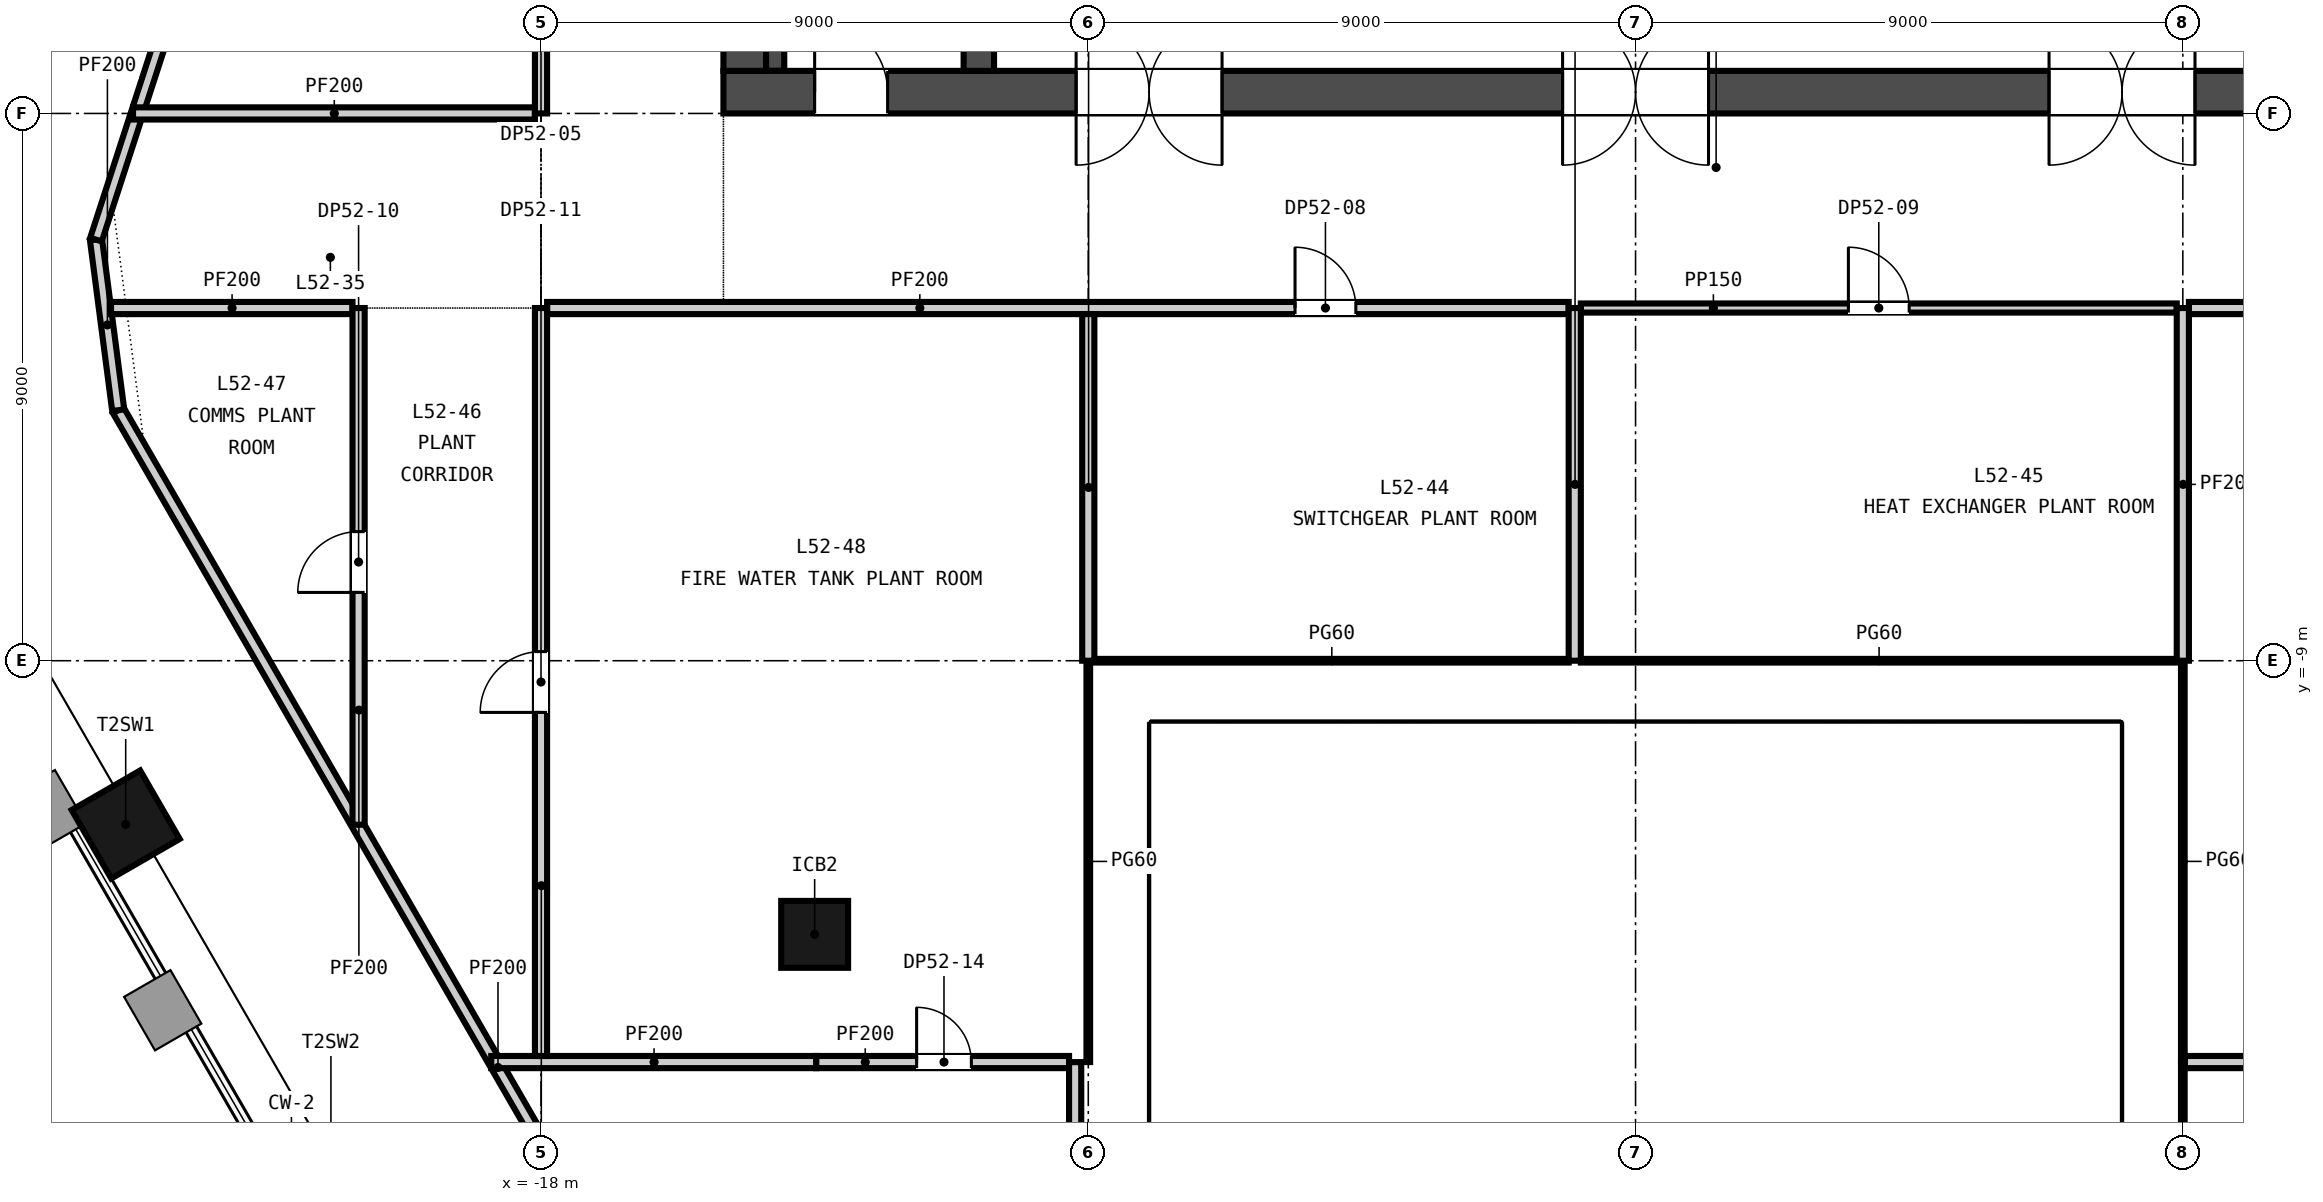
"""IFC4 building model, lengths in metres.
Left out: names, types, materials, properties, quantities, classifications, styles, units other than length and angle.
Written with IfcOpenShell. Run it as: python <this file> out.ifc"""

import sys

from ifc_helpers import new_model, si_unit, direction, frame, frame_2d, origin, origin_2d, place, context, subcontext, project, spatial, rectangle, extrude, element, fill, save


model = new_model("IFC4")
c1 = context("Model", 3, precision=1e-05, world=origin(), true_north=direction((0.0, 1.0)))
c2 = subcontext(c1, "Body", "Model", "MODEL_VIEW")
j1 = project(units=[si_unit("LENGTHUNIT", "METRE"), si_unit("PLANEANGLEUNIT", "RADIAN")], contexts=[c1])
p1 = place(None, origin())
s1 = spatial("IfcSite", under=j1, at=p1, CompositionType="ELEMENT")
p2 = place(p1, origin())
s2 = spatial("IfcBuilding", under=s1, at=p2, CompositionType="ELEMENT")
p3 = place(p2, frame((0.0, 0.0, 207.3)))
s3 = spatial("IfcBuildingStorey", under=s2, at=p3, CompositionType="ELEMENT", Elevation=207.3)
p4 = place(p3, frame((-15.0, 0.35, -0.3), z_axis=(0.0, 0.0, 1.0), x_axis=(1.0, 0.0, 0.0)))
e1 = element("IfcWall", 1, at=p4, inside=s3, PredefinedType="SOLIDWALL", context=c2, shape_type="SweptSolid", body=[
    extrude(rectangle(XDim=30.0, YDim=0.7, at=frame_2d((15.0, 0.0))), origin(), (0.0, 0.0, 1.0), 4.5),
])
p5 = place(p4, frame((5.8, 0.0, 0.3)))
e2 = element("IfcOpeningElement", 2, at=p5, cuts=e1, PredefinedType="OPENING", context=c2, shape_type="SweptSolid", body=[
    extrude(rectangle(XDim=2.4, YDim=2.4, at=frame_2d((1.2, 1.2))), frame((0.0, 0.36, 0.0), z_axis=(0.0, -1.0, 0.0), x_axis=(1.0, 0.0, 0.0)), (0.0, 0.0, 1.0), 0.72),
])
p6 = place(p4, frame((13.8, 0.0, 0.3)))
e3 = element("IfcOpeningElement", 3, at=p6, cuts=e1, PredefinedType="OPENING", context=c2, shape_type="SweptSolid", body=[
    extrude(rectangle(XDim=2.4, YDim=2.4, at=frame_2d((1.2, 1.2))), frame((0.0, 0.36, 0.0), z_axis=(0.0, -1.0, 0.0), x_axis=(1.0, 0.0, 0.0)), (0.0, 0.0, 1.0), 0.72),
])
p7 = place(p4, frame((21.8, 0.0, 0.3)))
e4 = element("IfcOpeningElement", 4, at=p7, cuts=e1, PredefinedType="OPENING", context=c2, shape_type="SweptSolid", body=[
    extrude(rectangle(XDim=2.4, YDim=2.4, at=frame_2d((1.2, 1.2))), frame((0.0, 0.36, 0.0), z_axis=(0.0, -1.0, 0.0), x_axis=(1.0, 0.0, 0.0)), (0.0, 0.0, 1.0), 0.72),
])
p8 = place(p4, frame((1.5, 0.0, 0.3)))
e5 = element("IfcOpeningElement", 5, at=p8, cuts=e1, PredefinedType="OPENING", context=c2, shape_type="SweptSolid", body=[
    extrude(rectangle(XDim=1.2, YDim=2.1, at=frame_2d((0.6, 1.05))), frame((0.0, 0.36, 0.0), z_axis=(0.0, -1.0, 0.0), x_axis=(1.0, 0.0, 0.0)), (0.0, 0.0, 1.0), 0.72),
])
p9 = place(p4, frame((27.3, 0.0, 0.3)))
e6 = element("IfcOpeningElement", 6, at=p9, cuts=e1, PredefinedType="OPENING", context=c2, shape_type="SweptSolid", body=[
    extrude(rectangle(XDim=1.2, YDim=2.1, at=frame_2d((0.6, 1.05))), frame((0.0, 0.36, 0.0), z_axis=(0.0, -1.0, 0.0), x_axis=(1.0, 0.0, 0.0)), (0.0, 0.0, 1.0), 0.72),
])
p10 = place(p3, frame((-14.65, 0.7, -0.3), z_axis=(0.0, 0.0, 1.0), x_axis=(0.0, 1.0, 0.0)))
e7 = element("IfcWall", 7, at=p10, inside=s3, PredefinedType="SOLIDWALL", context=c2, shape_type="SweptSolid", body=[
    extrude(rectangle(XDim=13.6, YDim=0.7, at=frame_2d((6.8, 0.0))), origin(), (0.0, 0.0, 1.0), 4.5),
])
p11 = place(p3, frame((-10.8, 0.7, -0.3), z_axis=(0.0, 0.0, 1.0), x_axis=(0.0, 1.0, 0.0)))
e8 = element("IfcWall", 8, at=p11, inside=s3, PredefinedType="SOLIDWALL", context=c2, shape_type="SweptSolid", body=[
    extrude(rectangle(XDim=13.6, YDim=0.5, at=frame_2d((6.8, 0.0))), origin(), (0.0, 0.0, 1.0), 4.5),
])
p12 = place(p3, frame((-24.83, -11.693, -0.3), z_axis=(0.0, 0.0, 1.0), x_axis=(0.5, -0.866025403784, 0.0)))
e9 = element("IfcColumn", 9, at=p12, inside=s3, PredefinedType="COLUMN", context=c2, shape_type="SweptSolid", body=[
    extrude(rectangle(XDim=1.3, YDim=1.3, at=origin_2d()), origin(), (0.0, 0.0, 1.0), 4.5),
])
p13 = place(p3, frame((-13.5, -13.5, -0.3), z_axis=(0.0, 0.0, 1.0), x_axis=(1.0, 0.0, 0.0)))
e10 = element("IfcColumn", 10, at=p13, inside=s3, PredefinedType="COLUMN", context=c2, shape_type="SweptSolid", body=[
    extrude(rectangle(XDim=1.1, YDim=1.1, at=origin_2d()), origin(), (0.0, 0.0, 1.0), 4.5),
])
p14 = place(p3, frame((-14.15, 0.7, 0.0), z_axis=(0.0, 0.0, 1.0), x_axis=(0.0, 1.0, 0.0)))
e11 = element("IfcWall", 11, at=p14, inside=s3, PredefinedType="SOLIDWALL", context=c2, shape_type="SweptSolid", body=[
    extrude(rectangle(XDim=13.6, YDim=0.3, at=frame_2d((6.8, 0.0))), origin(), (0.0, 0.0, 1.0), 4.2),
])
p15 = place(p3, frame((-18.818, -15.6, 0.0), z_axis=(0.0, 0.0, 1.0), x_axis=(1.0, 0.0, 0.0)))
e12 = element("IfcWall", 12, at=p15, inside=s3, PredefinedType="PARTITIONING", context=c2, shape_type="SweptSolid", body=[
    extrude(rectangle(XDim=5.345, YDim=0.2, at=frame_2d((2.673, 0.0))), origin(), (0.0, 0.0, 1.0), 4.2),
])
p16 = place(p3, frame((-13.473, -15.6, 0.0), z_axis=(0.0, 0.0, 1.0), x_axis=(1.0, 0.0, 0.0)))
e13 = element("IfcWall", 13, at=p16, inside=s3, PredefinedType="PARTITIONING", context=c2, shape_type="SweptSolid", body=[
    extrude(rectangle(XDim=4.157, YDim=0.2, at=frame_2d((2.079, 0.0))), origin(), (0.0, 0.0, 1.0), 3.749),
])
p17 = place(p16, frame((1.65, 0.0, 0.0)))
e14 = element("IfcOpeningElement", 14, at=p17, cuts=e13, PredefinedType="OPENING", context=c2, shape_type="SweptSolid", body=[
    extrude(rectangle(XDim=0.9, YDim=2.1, at=frame_2d((0.45, 1.05))), frame((0.0, 0.11, 0.0), z_axis=(0.0, -1.0, 0.0), x_axis=(1.0, 0.0, 0.0)), (0.0, 0.0, 1.0), 0.22),
])
p18 = place(p3, frame((9.03, -15.6, 0.0), z_axis=(0.0, 0.0, 1.0), x_axis=(1.0, 0.0, 0.0)))
e15 = element("IfcWall", 15, at=p18, inside=s3, PredefinedType="PARTITIONING", context=c2, shape_type="SweptSolid", body=[
    extrude(rectangle(XDim=4.484, YDim=0.2, at=frame_2d((2.242, 0.0))), origin(), (0.0, 0.0, 1.0), 4.2),
])
p19 = place(p3, frame((-8.9, -9.0, 0.0), z_axis=(0.0, 0.0, 1.0), x_axis=(1.0, 0.0, 0.0)))
e16 = element("IfcWall", 16, at=p19, inside=s3, PredefinedType="PARTITIONING", context=c2, shape_type="SweptSolid", body=[
    extrude(rectangle(XDim=7.8, YDim=0.06, at=frame_2d((3.9, 0.0))), origin(), (0.0, 0.0, 1.0), 4.2),
])
p20 = place(p3, frame((-0.9, -9.0, 0.0), z_axis=(0.0, 0.0, 1.0), x_axis=(1.0, 0.0, 0.0)))
e17 = element("IfcWall", 17, at=p20, inside=s3, PredefinedType="PARTITIONING", context=c2, shape_type="SweptSolid", body=[
    extrude(rectangle(XDim=9.8, YDim=0.06, at=frame_2d((4.9, 0.0))), origin(), (0.0, 0.0, 1.0), 4.2),
])
p21 = place(p3, frame((-25.071, -3.2, 0.0), z_axis=(0.0, 0.0, 1.0), x_axis=(1.0, 0.0, 0.0)))
e18 = element("IfcWall", 18, at=p21, inside=s3, PredefinedType="PARTITIONING", context=c2, shape_type="SweptSolid", body=[
    extrude(rectangle(XDim=3.971, YDim=0.2, at=frame_2d((1.985, 0.0))), origin(), (0.0, 0.0, 1.0), 4.2),
])
p22 = place(p3, frame((-17.9, -3.2, 0.0), z_axis=(0.0, 0.0, 1.0), x_axis=(1.0, 0.0, 0.0)))
e19 = element("IfcWall", 19, at=p22, inside=s3, PredefinedType="PARTITIONING", context=c2, shape_type="SweptSolid", body=[
    extrude(rectangle(XDim=16.8, YDim=0.2, at=frame_2d((8.4, 0.0))), origin(), (0.0, 0.0, 1.0), 4.2),
])
p23 = place(p22, frame((12.3, 0.0, 0.0)))
e20 = element("IfcOpeningElement", 20, at=p23, cuts=e19, PredefinedType="OPENING", context=c2, shape_type="SweptSolid", body=[
    extrude(rectangle(XDim=1.0, YDim=2.1, at=frame_2d((0.5, 1.05))), frame((0.0, 0.11, 0.0), z_axis=(0.0, -1.0, 0.0), x_axis=(1.0, 0.0, 0.0)), (0.0, 0.0, 1.0), 0.22),
])
p24 = place(p3, frame((-0.9, -3.2, 0.0), z_axis=(0.0, 0.0, 1.0), x_axis=(1.0, 0.0, 0.0)))
e21 = element("IfcWall", 21, at=p24, inside=s3, PredefinedType="PARTITIONING", context=c2, shape_type="SweptSolid", body=[
    extrude(rectangle(XDim=9.8, YDim=0.15, at=frame_2d((4.9, 0.0))), origin(), (0.0, 0.0, 1.0), 4.2),
])
p25 = place(p24, frame((4.4, 0.0, 0.0)))
e22 = element("IfcOpeningElement", 22, at=p25, cuts=e21, PredefinedType="OPENING", context=c2, shape_type="SweptSolid", body=[
    extrude(rectangle(XDim=1.0, YDim=2.1, at=frame_2d((0.5, 1.05))), frame((0.0, 0.085, 0.0), z_axis=(0.0, -1.0, 0.0), x_axis=(1.0, 0.0, 0.0)), (0.0, 0.0, 1.0), 0.17),
])
p26 = place(p3, frame((9.1, -3.2, 0.0), z_axis=(0.0, 0.0, 1.0), x_axis=(1.0, 0.0, 0.0)))
e23 = element("IfcWall", 23, at=p26, inside=s3, PredefinedType="PARTITIONING", context=c2, shape_type="SweptSolid", body=[
    extrude(rectangle(XDim=8.8, YDim=0.2, at=frame_2d((4.4, 0.0))), origin(), (0.0, 0.0, 1.0), 4.2),
])
p27 = place(p3, frame((-24.709, 0.0, 0.0), z_axis=(0.0, 0.0, 1.0), x_axis=(1.0, 0.0, 0.0)))
e24 = element("IfcWall", 24, at=p27, inside=s3, PredefinedType="PARTITIONING", context=c2, shape_type="SweptSolid", body=[
    extrude(rectangle(XDim=6.609, YDim=0.2, at=frame_2d((3.305, 0.0))), origin(), (0.0, 0.0, 1.0), 4.2),
])
p28 = place(p3, frame((-21.0, -11.697, 0.0), z_axis=(0.0, 0.0, 1.0), x_axis=(0.0, 1.0, 0.0)))
e25 = element("IfcWall", 25, at=p28, inside=s3, PredefinedType="PARTITIONING", context=c2, shape_type="SweptSolid", body=[
    extrude(rectangle(XDim=8.497, YDim=0.2, at=frame_2d((4.249, 0.0))), origin(), (0.0, 0.0, 1.0), 4.2),
])
p29 = place(p28, frame((3.82, 0.0, 0.0)))
e26 = element("IfcOpeningElement", 26, at=p29, cuts=e25, PredefinedType="OPENING", context=c2, shape_type="SweptSolid", body=[
    extrude(rectangle(XDim=1.0, YDim=2.1, at=frame_2d((0.5, 1.05))), frame((0.0, 0.11, 0.0), z_axis=(0.0, -1.0, 0.0), x_axis=(1.0, 0.0, 0.0)), (0.0, 0.0, 1.0), 0.22),
])
p30 = place(p3, frame((-18.0, -15.5, 0.0), z_axis=(0.0, 0.0, 1.0), x_axis=(0.0, 1.0, 0.0)))
e27 = element("IfcWall", 27, at=p30, inside=s3, PredefinedType="PARTITIONING", context=c2, shape_type="SweptSolid", body=[
    extrude(rectangle(XDim=12.3, YDim=0.2, at=frame_2d((6.15, 0.0))), origin(), (0.0, 0.0, 1.0), 4.2),
])
p31 = place(p30, frame((5.65, 0.0, 0.0)))
e28 = element("IfcOpeningElement", 28, at=p31, cuts=e27, PredefinedType="OPENING", context=c2, shape_type="SweptSolid", body=[
    extrude(rectangle(XDim=1.0, YDim=2.1, at=frame_2d((0.5, 1.05))), frame((0.0, 0.11, 0.0), z_axis=(0.0, -1.0, 0.0), x_axis=(1.0, 0.0, 0.0)), (0.0, 0.0, 1.0), 0.22),
])
p32 = place(p3, frame((-18.0, 0.0, 0.0), z_axis=(0.0, 0.0, 1.0), x_axis=(0.0, 1.0, 0.0)))
e29 = element("IfcWall", 29, at=p32, inside=s3, PredefinedType="PARTITIONING", context=c2, shape_type="SweptSolid", body=[
    extrude(rectangle(XDim=15.0, YDim=0.2, at=frame_2d((7.5, 0.0))), origin(), (0.0, 0.0, 1.0), 4.2),
])
p33 = place(p32, frame((6.9, 0.0, 0.0)))
e30 = element("IfcOpeningElement", 30, at=p33, cuts=e29, PredefinedType="OPENING", context=c2, shape_type="SweptSolid", body=[
    extrude(rectangle(XDim=1.0, YDim=2.1, at=frame_2d((0.5, 1.05))), frame((0.0, 0.11, 0.0), z_axis=(0.0, -1.0, 0.0), x_axis=(1.0, 0.0, 0.0)), (0.0, 0.0, 1.0), 0.22),
])
p34 = place(p3, frame((-9.216, -25.818, 0.0), z_axis=(0.0, 0.0, 1.0), x_axis=(0.0, 1.0, 0.0)))
e31 = element("IfcWall", 31, at=p34, inside=s3, PredefinedType="PARTITIONING", context=c2, shape_type="SweptSolid", body=[
    extrude(rectangle(XDim=10.217, YDim=0.2, at=frame_2d((5.109, 0.0))), origin(), (0.0, 0.0, 1.0), 4.2),
])
p35 = place(p3, frame((-9.0, -15.6, 0.0), z_axis=(0.0, 0.0, 1.0), x_axis=(0.0, 1.0, 0.0)))
e32 = element("IfcWall", 32, at=p35, inside=s3, PredefinedType="PARTITIONING", context=c2, shape_type="SweptSolid", body=[
    extrude(rectangle(XDim=6.599, YDim=0.06, at=frame_2d((3.3, 0.0))), origin(), (0.0, 0.0, 1.0), 4.2),
])
p36 = place(p3, frame((-9.0, -9.0, 0.0), z_axis=(0.0, 0.0, 1.0), x_axis=(0.0, 1.0, 0.0)))
e33 = element("IfcWall", 33, at=p36, inside=s3, PredefinedType="PARTITIONING", context=c2, shape_type="SweptSolid", body=[
    extrude(rectangle(XDim=5.7, YDim=0.2, at=frame_2d((2.85, 0.0))), origin(), (0.0, 0.0, 1.0), 4.2),
])
p37 = place(p3, frame((-1.0, -9.0, 0.0), z_axis=(0.0, 0.0, 1.0), x_axis=(0.0, 1.0, 0.0)))
e34 = element("IfcWall", 34, at=p37, inside=s3, PredefinedType="PARTITIONING", context=c2, shape_type="SweptSolid", body=[
    extrude(rectangle(XDim=5.8, YDim=0.2, at=frame_2d((2.9, 0.0))), origin(), (0.0, 0.0, 1.0), 4.2),
])
p38 = place(p3, frame((9.0, -21.947, 0.0), z_axis=(0.0, 0.0, 1.0), x_axis=(0.0, 1.0, 0.0)))
e35 = element("IfcWall", 35, at=p38, inside=s3, PredefinedType="PARTITIONING", context=c2, shape_type="SweptSolid", body=[
    extrude(rectangle(XDim=6.345, YDim=0.06, at=frame_2d((3.173, 0.0))), origin(), (0.0, 0.0, 1.0), 4.2),
])
p39 = place(p3, frame((9.0, -15.599, 0.0), z_axis=(0.0, 0.0, 1.0), x_axis=(0.0, 1.0, 0.0)))
e36 = element("IfcWall", 36, at=p39, inside=s3, PredefinedType="PARTITIONING", context=c2, shape_type="SweptSolid", body=[
    extrude(rectangle(XDim=6.598, YDim=0.06, at=frame_2d((3.299, 0.0))), origin(), (0.0, 0.0, 1.0), 4.2),
])
p40 = place(p3, frame((9.0, -9.0, 0.0), z_axis=(0.0, 0.0, 1.0), x_axis=(0.0, 1.0, 0.0)))
e37 = element("IfcWall", 37, at=p40, inside=s3, PredefinedType="PARTITIONING", context=c2, shape_type="SweptSolid", body=[
    extrude(rectangle(XDim=5.8, YDim=0.2, at=frame_2d((2.9, 0.0))), origin(), (0.0, 0.0, 1.0), 4.2),
])
p41 = place(p3, frame((-12.472, -26.498, 0.0), z_axis=(0.0, 0.0, 1.0), x_axis=(-0.499996482004, 0.866027434891, 0.0)))
e38 = element("IfcWall", 38, at=p41, inside=s3, PredefinedType="PARTITIONING", context=c2, shape_type="SweptSolid", body=[
    extrude(rectangle(XDim=24.962, YDim=0.2, at=frame_2d((12.481, 0.0))), origin(), (0.0, 0.0, 1.0), 4.2),
])
p42 = place(p3, frame((-24.953, -4.88, 0.0), z_axis=(0.0, 0.0, 1.0), x_axis=(-0.129173182048, 0.991622049493, 0.0)))
e39 = element("IfcWall", 39, at=p42, inside=s3, PredefinedType="PARTITIONING", context=c2, shape_type="SweptSolid", body=[
    extrude(rectangle(XDim=2.829, YDim=0.2, at=frame_2d((1.415, 0.0))), origin(), (0.0, 0.0, 1.0), 4.2),
])
p43 = place(p3, frame((-25.318, -2.075, 0.0), z_axis=(0.0, 0.0, 1.0), x_axis=(0.309016450058, 0.951056693154, 0.0)))
e40 = element("IfcWall", 40, at=p43, inside=s3, PredefinedType="PARTITIONING", context=c2, shape_type="SweptSolid", body=[
    extrude(rectangle(XDim=27.356, YDim=0.2, at=frame_2d((13.678, 0.0))), origin(), (0.0, 0.0, 1.0), 4.2),
])
p44 = place(p5, origin())
e41 = element("IfcDoor", 41, at=p44, inside=s3, OperationType="DOUBLE_DOOR_DOUBLE_SWING", PredefinedType="DOOR", context=c2, shape_type="SweptSolid", body=[
    extrude(rectangle(XDim=2.4, YDim=2.4, at=frame_2d((1.2, 1.2))), frame((0.0, 0.025, 0.0), z_axis=(0.0, -1.0, 0.0), x_axis=(1.0, 0.0, 0.0)), (0.0, 0.0, 1.0), 0.05),
])
fill(e2, e41)
p45 = place(p6, origin())
e42 = element("IfcDoor", 42, at=p45, inside=s3, OperationType="DOUBLE_DOOR_DOUBLE_SWING", PredefinedType="DOOR", context=c2, shape_type="SweptSolid", body=[
    extrude(rectangle(XDim=2.4, YDim=2.4, at=frame_2d((1.2, 1.2))), frame((0.0, 0.025, 0.0), z_axis=(0.0, -1.0, 0.0), x_axis=(1.0, 0.0, 0.0)), (0.0, 0.0, 1.0), 0.05),
])
fill(e3, e42)
p46 = place(p7, origin())
e43 = element("IfcDoor", 43, at=p46, inside=s3, OperationType="DOUBLE_DOOR_DOUBLE_SWING", PredefinedType="DOOR", context=c2, shape_type="SweptSolid", body=[
    extrude(rectangle(XDim=2.4, YDim=2.4, at=frame_2d((1.2, 1.2))), frame((0.0, 0.025, 0.0), z_axis=(0.0, -1.0, 0.0), x_axis=(1.0, 0.0, 0.0)), (0.0, 0.0, 1.0), 0.05),
])
fill(e4, e43)
p47 = place(p8, origin())
e44 = element("IfcDoor", 44, at=p47, inside=s3, OperationType="SINGLE_SWING_LEFT", PredefinedType="DOOR", context=c2, shape_type="SweptSolid", body=[
    extrude(rectangle(XDim=1.2, YDim=2.1, at=frame_2d((0.6, 1.05))), frame((0.0, 0.025, 0.0), z_axis=(0.0, -1.0, 0.0), x_axis=(1.0, 0.0, 0.0)), (0.0, 0.0, 1.0), 0.05),
])
fill(e5, e44)
p48 = place(p23, origin())
e45 = element("IfcDoor", 45, at=p48, inside=s3, OperationType="SINGLE_SWING_LEFT", PredefinedType="DOOR", context=c2, shape_type="SweptSolid", body=[
    extrude(rectangle(XDim=1.0, YDim=2.1, at=frame_2d((0.5, 1.05))), frame((0.0, 0.025, 0.0), z_axis=(0.0, -1.0, 0.0), x_axis=(1.0, 0.0, 0.0)), (0.0, 0.0, 1.0), 0.05),
])
fill(e20, e45)
p49 = place(p25, origin())
e46 = element("IfcDoor", 46, at=p49, inside=s3, OperationType="SINGLE_SWING_LEFT", PredefinedType="DOOR", context=c2, shape_type="SweptSolid", body=[
    extrude(rectangle(XDim=1.0, YDim=2.1, at=frame_2d((0.5, 1.05))), frame((0.0, 0.025, 0.0), z_axis=(0.0, -1.0, 0.0), x_axis=(1.0, 0.0, 0.0)), (0.0, 0.0, 1.0), 0.05),
])
fill(e22, e46)
p50 = place(p29, origin())
e47 = element("IfcDoor", 47, at=p50, inside=s3, OperationType="SINGLE_SWING_LEFT", PredefinedType="DOOR", context=c2, shape_type="SweptSolid", body=[
    extrude(rectangle(XDim=1.0, YDim=2.1, at=frame_2d((0.5, 1.05))), frame((0.0, 0.025, 0.0), z_axis=(0.0, -1.0, 0.0), x_axis=(1.0, 0.0, 0.0)), (0.0, 0.0, 1.0), 0.05),
])
fill(e26, e47)
p51 = place(p31, origin())
e48 = element("IfcDoor", 48, at=p51, inside=s3, OperationType="SINGLE_SWING_LEFT", PredefinedType="DOOR", context=c2, shape_type="SweptSolid", body=[
    extrude(rectangle(XDim=1.0, YDim=2.1, at=frame_2d((0.5, 1.05))), frame((0.0, 0.025, 0.0), z_axis=(0.0, -1.0, 0.0), x_axis=(1.0, 0.0, 0.0)), (0.0, 0.0, 1.0), 0.05),
])
fill(e28, e48)
p52 = place(p17, origin())
e49 = element("IfcDoor", 49, at=p52, inside=s3, OperationType="SINGLE_SWING_LEFT", PredefinedType="DOOR", context=c2, shape_type="SweptSolid", body=[
    extrude(rectangle(XDim=0.9, YDim=2.1, at=frame_2d((0.45, 1.05))), frame((0.0, 0.025, 0.0), z_axis=(0.0, -1.0, 0.0), x_axis=(1.0, 0.0, 0.0)), (0.0, 0.0, 1.0), 0.05),
])
fill(e14, e49)
save(model, sys.argv[1])
